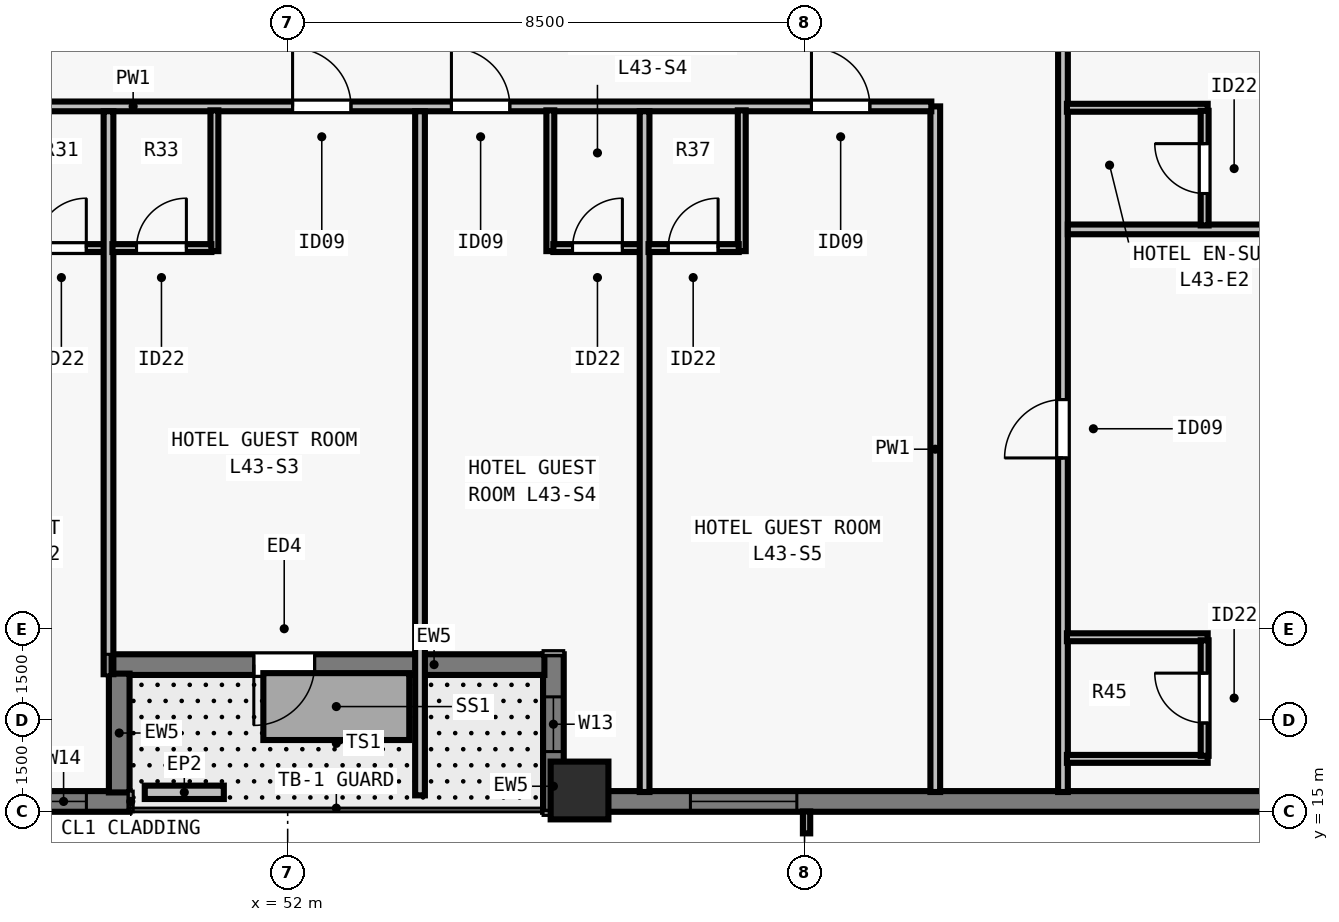
"""IFC4 building model, lengths in metres.
Left out: names, types, materials, properties, quantities, classifications, styles, units other than length and angle.
Written with IfcOpenShell. Run it as: python <this file> out.ifc"""

import sys

from ifc_helpers import new_model, si_unit, direction, frame, frame_2d, origin, origin_2d, place, context, subcontext, project, spatial, rectangle, extrude, element, fill, save


model = new_model("IFC4")
c1 = context("Model", 3, precision=1e-05, world=origin(), true_north=direction((0.0, 1.0)))
c2 = subcontext(c1, "Body", "Model", "MODEL_VIEW")
j1 = project(units=[si_unit("LENGTHUNIT", "METRE"), si_unit("PLANEANGLEUNIT", "RADIAN")], contexts=[c1])
p1 = place(None, origin())
s1 = spatial("IfcSite", under=j1, at=p1, CompositionType="ELEMENT")
p2 = place(p1, origin())
s2 = spatial("IfcBuilding", under=s1, at=p2, CompositionType="ELEMENT")
p3 = place(p2, frame((0.0, 0.0, 158.5)))
s3 = spatial("IfcBuildingStorey", under=s2, at=p3, CompositionType="ELEMENT", Elevation=158.5)
p4 = place(p3, frame((56.8, 15.35, 0.0), z_axis=(0.0, 0.0, 1.0), x_axis=(1.0, 0.0, 0.0)))
e1 = element("IfcColumn", 1, at=p4, inside=s3, PredefinedType="COLUMN", context=c2, shape_type="SweptSolid", body=[
    extrude(rectangle(XDim=0.95, YDim=0.95, at=origin_2d()), origin(), (0.0, 0.0, 1.0), 3.5),
])
p5 = place(p3, frame((49.4, 15.17, 0.0), z_axis=(0.0, 0.0, 1.0), x_axis=(-1.0, 0.0, 0.0)))
e2 = element("IfcWall", 2, at=p5, inside=s3, PredefinedType="SOLIDWALL", context=c2, shape_type="SweptSolid", body=[
    extrude(rectangle(XDim=17.082, YDim=0.34, at=frame_2d((8.541, 0.0))), origin(), (0.0, 0.0, 1.0), 3.28),
])
p6 = place(p5, frame((6.566, 0.0, 0.8)))
e3 = element("IfcOpeningElement", 3, at=p6, cuts=e2, PredefinedType="OPENING", context=c2, shape_type="SweptSolid", body=[
    extrude(rectangle(XDim=1.35, YDim=1.66, at=frame_2d((0.675, 0.83))), frame((0.0, 0.18, 0.0), z_axis=(0.0, -1.0, 0.0), x_axis=(1.0, 0.0, 0.0)), (0.0, 0.0, 1.0), 0.36),
])
p7 = place(p5, frame((0.71, 0.0, 0.8)))
e4 = element("IfcOpeningElement", 4, at=p7, cuts=e2, PredefinedType="OPENING", context=c2, shape_type="SweptSolid", body=[
    extrude(rectangle(XDim=0.75, YDim=1.66, at=frame_2d((0.375, 0.83))), frame((0.0, 0.18, 0.0), z_axis=(0.0, -1.0, 0.0), x_axis=(1.0, 0.0, 0.0)), (0.0, 0.0, 1.0), 0.36),
])
p8 = place(p3, frame((72.0, 15.17, 0.0), z_axis=(0.0, 0.0, 1.0), x_axis=(-1.0, 0.0, 0.0)))
e5 = element("IfcWall", 5, at=p8, inside=s3, PredefinedType="SOLIDWALL", context=c2, shape_type="SweptSolid", body=[
    extrude(rectangle(XDim=15.482, YDim=0.34, at=frame_2d((7.741, 0.0))), origin(), (0.0, 0.0, 1.0), 3.28),
])
p9 = place(p8, frame((11.627, 0.0, 0.8)))
e6 = element("IfcOpeningElement", 6, at=p9, cuts=e5, PredefinedType="OPENING", context=c2, shape_type="SweptSolid", body=[
    extrude(rectangle(XDim=1.75, YDim=1.66, at=frame_2d((0.875, 0.83))), frame((0.0, 0.18, 0.0), z_axis=(0.0, -1.0, 0.0), x_axis=(1.0, 0.0, 0.0)), (0.0, 0.0, 1.0), 0.36),
])
p10 = place(p3, frame((56.37, 15.0, 0.0), z_axis=(0.0, 0.0, 1.0), x_axis=(0.0, 1.0, 0.0)))
e7 = element("IfcWall", 7, at=p10, inside=s3, PredefinedType="SOLIDWALL", context=c2, shape_type="SweptSolid", body=[
    extrude(rectangle(XDim=2.59, YDim=0.34, at=frame_2d((1.295, 0.0))), origin(), (0.0, 0.0, 1.0), 3.28),
])
p11 = place(p10, frame((0.99, 0.0, 0.8)))
e8 = element("IfcOpeningElement", 8, at=p11, cuts=e7, PredefinedType="OPENING", context=c2, shape_type="SweptSolid", body=[
    extrude(rectangle(XDim=0.9, YDim=1.66, at=frame_2d((0.45, 0.83))), frame((0.0, 0.18, 0.0), z_axis=(0.0, -1.0, 0.0), x_axis=(1.0, 0.0, 0.0)), (0.0, 0.0, 1.0), 0.36),
])
p12 = place(p3, frame((56.222, 17.42, 0.0), z_axis=(0.0, 0.0, 1.0), x_axis=(-1.0, 0.0, 0.0)))
e9 = element("IfcWall", 9, at=p12, inside=s3, PredefinedType="SOLIDWALL", context=c2, shape_type="SweptSolid", body=[
    extrude(rectangle(XDim=7.162, YDim=0.34, at=frame_2d((3.581, 0.0))), origin(), (0.0, 0.0, 1.0), 3.28),
])
p13 = place(p12, frame((3.779, 0.0, 0.0)))
e10 = element("IfcOpeningElement", 10, at=p13, cuts=e9, PredefinedType="OPENING", context=c2, shape_type="SweptSolid", body=[
    extrude(rectangle(XDim=1.0, YDim=2.15, at=frame_2d((0.5, 1.075))), frame((0.0, 0.18, 0.0), z_axis=(0.0, -1.0, 0.0), x_axis=(1.0, 0.0, 0.0)), (0.0, 0.0, 1.0), 0.36),
])
p14 = place(p3, frame((49.23, 17.272, 0.0), z_axis=(0.0, 0.0, 1.0), x_axis=(0.0, -1.0, 0.0)))
e11 = element("IfcWall", 11, at=p14, inside=s3, PredefinedType="SOLIDWALL", context=c2, shape_type="SweptSolid", body=[
    extrude(rectangle(XDim=1.954, YDim=0.34, at=frame_2d((0.977, 0.0))), origin(), (0.0, 0.0, 1.0), 3.28),
])
p15 = place(p3, frame((49.65, 15.32, 0.0), z_axis=(0.0, 0.0, 1.0), x_axis=(1.0, 0.0, 0.0)))
e12 = element("IfcWall", 12, at=p15, inside=s3, PredefinedType="PARAPET", context=c2, shape_type="SweptSolid", body=[
    extrude(rectangle(XDim=1.3, YDim=0.22, at=frame_2d((0.65, 0.0))), origin(), (0.0, 0.0, 1.0), 0.55),
])
p16 = place(p3, frame((64.75, 15.325, 0.0), z_axis=(0.0, 0.0, 1.0), x_axis=(0.0, 1.0, 0.0)))
e13 = element("IfcWall", 13, at=p16, inside=s3, PredefinedType="PARTITIONING", context=c2, shape_type="SweptSolid", body=[
    extrude(rectangle(XDim=47.35, YDim=0.16, at=frame_2d((23.675, 0.0))), origin(), (0.0, 0.0, 1.0), 2.555),
])
p17 = place(p16, frame((5.494, 0.0, 0.0)))
e14 = element("IfcOpeningElement", 14, at=p17, cuts=e13, PredefinedType="OPENING", context=c2, shape_type="SweptSolid", body=[
    extrude(rectangle(XDim=0.96, YDim=2.15, at=frame_2d((0.48, 1.075))), frame((0.0, 0.09, 0.0), z_axis=(0.0, -1.0, 0.0), x_axis=(1.0, 0.0, 0.0)), (0.0, 0.0, 1.0), 0.18),
])
p18 = place(p16, frame((14.796, 0.0, 0.0)))
e15 = element("IfcOpeningElement", 15, at=p18, cuts=e13, PredefinedType="OPENING", context=c2, shape_type="SweptSolid", body=[
    extrude(rectangle(XDim=0.96, YDim=2.15, at=frame_2d((0.48, 1.075))), frame((0.0, 0.09, 0.0), z_axis=(0.0, -1.0, 0.0), x_axis=(1.0, 0.0, 0.0)), (0.0, 0.0, 1.0), 0.18),
])
p19 = place(p16, frame((24.228, 0.0, 0.0)))
e16 = element("IfcOpeningElement", 16, at=p19, cuts=e13, PredefinedType="OPENING", context=c2, shape_type="SweptSolid", body=[
    extrude(rectangle(XDim=0.96, YDim=2.15, at=frame_2d((0.48, 1.075))), frame((0.0, 0.09, 0.0), z_axis=(0.0, -1.0, 0.0), x_axis=(1.0, 0.0, 0.0)), (0.0, 0.0, 1.0), 0.18),
])
p20 = place(p16, frame((33.66, 0.0, 0.0)))
e17 = element("IfcOpeningElement", 17, at=p20, cuts=e13, PredefinedType="OPENING", context=c2, shape_type="SweptSolid", body=[
    extrude(rectangle(XDim=0.96, YDim=2.15, at=frame_2d((0.48, 1.075))), frame((0.0, 0.09, 0.0), z_axis=(0.0, -1.0, 0.0), x_axis=(1.0, 0.0, 0.0)), (0.0, 0.0, 1.0), 0.18),
])
p21 = place(p16, frame((43.229, 0.0, 0.0)))
e18 = element("IfcOpeningElement", 18, at=p21, cuts=e13, PredefinedType="OPENING", context=c2, shape_type="SweptSolid", body=[
    extrude(rectangle(XDim=0.96, YDim=2.15, at=frame_2d((0.48, 1.075))), frame((0.0, 0.09, 0.0), z_axis=(0.0, -1.0, 0.0), x_axis=(1.0, 0.0, 0.0)), (0.0, 0.0, 1.0), 0.18),
])
p22 = place(p3, frame((62.65, 15.325, 0.0), z_axis=(0.0, 0.0, 1.0), x_axis=(0.0, 1.0, 0.0)))
e19 = element("IfcWall", 19, at=p22, inside=s3, PredefinedType="PARTITIONING", context=c2, shape_type="SweptSolid", body=[
    extrude(rectangle(XDim=11.275, YDim=0.16, at=frame_2d((5.638, 0.0))), origin(), (0.0, 0.0, 1.0), 3.28),
])
p23 = place(p3, frame((40.515, 26.6, 0.0), z_axis=(0.0, 0.0, 1.0), x_axis=(1.0, 0.0, 0.0)))
e20 = element("IfcWall", 20, at=p23, inside=s3, PredefinedType="PARTITIONING", context=c2, shape_type="SweptSolid", body=[
    extrude(rectangle(XDim=22.07, YDim=0.16, at=frame_2d((11.035, 0.0))), origin(), (0.0, 0.0, 1.0), 3.28),
])
p24 = place(p23, frame((3.072, 0.0, 0.0)))
e21 = element("IfcOpeningElement", 21, at=p24, cuts=e20, PredefinedType="OPENING", context=c2, shape_type="SweptSolid", body=[
    extrude(rectangle(XDim=0.96, YDim=2.15, at=frame_2d((0.48, 1.075))), frame((0.0, 0.09, 0.0), z_axis=(0.0, -1.0, 0.0), x_axis=(1.0, 0.0, 0.0)), (0.0, 0.0, 1.0), 0.18),
])
p25 = place(p23, frame((5.362, 0.0, 0.0)))
e22 = element("IfcOpeningElement", 22, at=p25, cuts=e20, PredefinedType="OPENING", context=c2, shape_type="SweptSolid", body=[
    extrude(rectangle(XDim=0.96, YDim=2.15, at=frame_2d((0.48, 1.075))), frame((0.0, 0.09, 0.0), z_axis=(0.0, -1.0, 0.0), x_axis=(1.0, 0.0, 0.0)), (0.0, 0.0, 1.0), 0.18),
])
p26 = place(p23, frame((11.566, 0.0, 0.0)))
e23 = element("IfcOpeningElement", 23, at=p26, cuts=e20, PredefinedType="OPENING", context=c2, shape_type="SweptSolid", body=[
    extrude(rectangle(XDim=0.96, YDim=2.15, at=frame_2d((0.48, 1.075))), frame((0.0, 0.09, 0.0), z_axis=(0.0, -1.0, 0.0), x_axis=(1.0, 0.0, 0.0)), (0.0, 0.0, 1.0), 0.18),
])
p27 = place(p23, frame((14.178, 0.0, 0.0)))
e24 = element("IfcOpeningElement", 24, at=p27, cuts=e20, PredefinedType="OPENING", context=c2, shape_type="SweptSolid", body=[
    extrude(rectangle(XDim=0.96, YDim=2.15, at=frame_2d((0.48, 1.075))), frame((0.0, 0.09, 0.0), z_axis=(0.0, -1.0, 0.0), x_axis=(1.0, 0.0, 0.0)), (0.0, 0.0, 1.0), 0.18),
])
p28 = place(p23, frame((20.099, 0.0, 0.0)))
e25 = element("IfcOpeningElement", 25, at=p28, cuts=e20, PredefinedType="OPENING", context=c2, shape_type="SweptSolid", body=[
    extrude(rectangle(XDim=0.96, YDim=2.15, at=frame_2d((0.48, 1.075))), frame((0.0, 0.09, 0.0), z_axis=(0.0, -1.0, 0.0), x_axis=(1.0, 0.0, 0.0)), (0.0, 0.0, 1.0), 0.18),
])
p29 = place(p3, frame((47.553, 24.27, 0.0), z_axis=(0.0, 0.0, 1.0), x_axis=(1.0, 0.0, 0.0)))
e26 = element("IfcWall", 26, at=p29, inside=s3, PredefinedType="PLUMBINGWALL", context=c2, shape_type="SweptSolid", body=[
    extrude(rectangle(XDim=1.55, YDim=0.13, at=frame_2d((0.775, 0.0))), origin(), (0.0, 0.0, 1.0), 3.28),
])
p30 = place(p29, frame((0.315, 0.0, 0.0)))
e27 = element("IfcOpeningElement", 27, at=p30, cuts=e26, PredefinedType="OPENING", context=c2, shape_type="SweptSolid", body=[
    extrude(rectangle(XDim=0.82, YDim=2.1, at=frame_2d((0.41, 1.05))), frame((0.0, 0.075, 0.0), z_axis=(0.0, -1.0, 0.0), x_axis=(1.0, 0.0, 0.0)), (0.0, 0.0, 1.0), 0.15),
])
p31 = place(p3, frame((49.053, 17.262, 0.0), z_axis=(0.0, 0.0, 1.0), x_axis=(0.0, 1.0, 0.0)))
e28 = element("IfcWall", 28, at=p31, inside=s3, PredefinedType="PARTITIONING", context=c2, shape_type="SweptSolid", body=[
    extrude(rectangle(XDim=9.258, YDim=0.16, at=frame_2d((4.629, 0.0))), origin(), (0.0, 0.0, 1.0), 2.896),
])
p32 = place(p3, frame((50.795, 24.22, 0.0), z_axis=(0.0, 0.0, 1.0), x_axis=(0.0, 1.0, 0.0)))
e29 = element("IfcWall", 29, at=p32, inside=s3, PredefinedType="PLUMBINGWALL", context=c2, shape_type="SweptSolid", body=[
    extrude(rectangle(XDim=2.315, YDim=0.13, at=frame_2d((1.157, 0.0))), origin(), (0.0, 0.0, 1.0), 3.28),
])
p33 = place(p3, frame((49.118, 24.27, 0.0), z_axis=(0.0, 0.0, 1.0), x_axis=(1.0, 0.0, 0.0)))
e30 = element("IfcWall", 30, at=p33, inside=s3, PredefinedType="PLUMBINGWALL", context=c2, shape_type="SweptSolid", body=[
    extrude(rectangle(XDim=1.627, YDim=0.13, at=frame_2d((0.813, 0.0))), origin(), (0.0, 0.0, 1.0), 3.28),
])
p34 = place(p33, frame((0.396, 0.0, 0.0)))
e31 = element("IfcOpeningElement", 31, at=p34, cuts=e30, PredefinedType="OPENING", context=c2, shape_type="SweptSolid", body=[
    extrude(rectangle(XDim=0.82, YDim=2.1, at=frame_2d((0.41, 1.05))), frame((0.0, 0.075, 0.0), z_axis=(0.0, -1.0, 0.0), x_axis=(1.0, 0.0, 0.0)), (0.0, 0.0, 1.0), 0.15),
])
p35 = place(p3, frame((54.177, 15.27, 0.0), z_axis=(0.0, 0.0, 1.0), x_axis=(0.0, 1.0, 0.0)))
e32 = element("IfcWall", 32, at=p35, inside=s3, PredefinedType="PARTITIONING", context=c2, shape_type="SweptSolid", body=[
    extrude(rectangle(XDim=11.25, YDim=0.16, at=frame_2d((5.625, 0.0))), origin(), (0.0, 0.0, 1.0), 2.896),
])
p36 = place(p3, frame((56.32, 24.22, 0.0), z_axis=(0.0, 0.0, 1.0), x_axis=(0.0, 1.0, 0.0)))
e33 = element("IfcWall", 33, at=p36, inside=s3, PredefinedType="PLUMBINGWALL", context=c2, shape_type="SweptSolid", body=[
    extrude(rectangle(XDim=2.315, YDim=0.13, at=frame_2d((1.157, 0.0))), origin(), (0.0, 0.0, 1.0), 3.28),
])
p37 = place(p3, frame((56.369, 24.27, 0.0), z_axis=(0.0, 0.0, 1.0), x_axis=(1.0, 0.0, 0.0)))
e34 = element("IfcWall", 34, at=p37, inside=s3, PredefinedType="PLUMBINGWALL", context=c2, shape_type="SweptSolid", body=[
    extrude(rectangle(XDim=1.55, YDim=0.13, at=frame_2d((0.775, 0.0))), origin(), (0.0, 0.0, 1.0), 3.28),
])
p38 = place(p37, frame((0.315, 0.0, 0.0)))
e35 = element("IfcOpeningElement", 35, at=p38, cuts=e34, PredefinedType="OPENING", context=c2, shape_type="SweptSolid", body=[
    extrude(rectangle(XDim=0.82, YDim=2.1, at=frame_2d((0.41, 1.05))), frame((0.0, 0.075, 0.0), z_axis=(0.0, -1.0, 0.0), x_axis=(1.0, 0.0, 0.0)), (0.0, 0.0, 1.0), 0.15),
])
p39 = place(p3, frame((57.869, 15.325, 0.0), z_axis=(0.0, 0.0, 1.0), x_axis=(0.0, 1.0, 0.0)))
e36 = element("IfcWall", 36, at=p39, inside=s3, PredefinedType="PARTITIONING", context=c2, shape_type="SweptSolid", body=[
    extrude(rectangle(XDim=11.195, YDim=0.16, at=frame_2d((5.598, 0.0))), origin(), (0.0, 0.0, 1.0), 3.28),
])
p40 = place(p3, frame((59.468, 24.22, 0.0), z_axis=(0.0, 0.0, 1.0), x_axis=(0.0, 1.0, 0.0)))
e37 = element("IfcWall", 37, at=p40, inside=s3, PredefinedType="PLUMBINGWALL", context=c2, shape_type="SweptSolid", body=[
    extrude(rectangle(XDim=2.315, YDim=0.13, at=frame_2d((1.157, 0.0))), origin(), (0.0, 0.0, 1.0), 3.28),
])
p41 = place(p3, frame((57.935, 24.27, 0.0), z_axis=(0.0, 0.0, 1.0), x_axis=(1.0, 0.0, 0.0)))
e38 = element("IfcWall", 38, at=p41, inside=s3, PredefinedType="PLUMBINGWALL", context=c2, shape_type="SweptSolid", body=[
    extrude(rectangle(XDim=1.483, YDim=0.13, at=frame_2d((0.742, 0.0))), origin(), (0.0, 0.0, 1.0), 3.28),
])
p42 = place(p41, frame((0.324, 0.0, 0.0)))
e39 = element("IfcOpeningElement", 39, at=p42, cuts=e38, PredefinedType="OPENING", context=c2, shape_type="SweptSolid", body=[
    extrude(rectangle(XDim=0.82, YDim=2.1, at=frame_2d((0.41, 1.05))), frame((0.0, 0.075, 0.0), z_axis=(0.0, -1.0, 0.0), x_axis=(1.0, 0.0, 0.0)), (0.0, 0.0, 1.0), 0.15),
])
for number, where, z_axis, x_axis in (
    (40, (64.815, 15.87, 0.0), (0.0, 0.0, 1.0), (1.0, 0.0, 0.0)),
    (41, (64.815, 17.87, 0.0), (0.0, 0.0, 1.0), (1.0, 0.0, 0.0)),
):
    element("IfcWall", number, at=place(p3, frame(where, z_axis=z_axis, x_axis=x_axis)), inside=s3, PredefinedType="PLUMBINGWALL", context=c2, shape_type="SweptSolid", body=[
        extrude(rectangle(XDim=2.315, YDim=0.13, at=frame_2d((1.157, 0.0))), origin(), (0.0, 0.0, 1.0), 3.28),
    ])
p43 = place(p3, frame((67.08, 15.92, 0.0), z_axis=(0.0, 0.0, 1.0), x_axis=(0.0, 1.0, 0.0)))
e42 = element("IfcWall", 42, at=p43, inside=s3, PredefinedType="PLUMBINGWALL", context=c2, shape_type="SweptSolid", body=[
    extrude(rectangle(XDim=1.9, YDim=0.13, at=frame_2d((0.95, 0.0))), origin(), (0.0, 0.0, 1.0), 3.28),
])
p44 = place(p43, frame((0.54, 0.0, 0.0)))
e43 = element("IfcOpeningElement", 43, at=p44, cuts=e42, PredefinedType="OPENING", context=c2, shape_type="SweptSolid", body=[
    extrude(rectangle(XDim=0.82, YDim=2.1, at=frame_2d((0.41, 1.05))), frame((0.0, 0.075, 0.0), z_axis=(0.0, -1.0, 0.0), x_axis=(1.0, 0.0, 0.0)), (0.0, 0.0, 1.0), 0.15),
])
p45 = place(p3, frame((64.83, 24.577, 0.0), z_axis=(0.0, 0.0, 1.0), x_axis=(1.0, 0.0, 0.0)))
e44 = element("IfcWall", 44, at=p45, inside=s3, PredefinedType="PARTITIONING", context=c2, shape_type="SweptSolid", body=[
    extrude(rectangle(XDim=10.845, YDim=0.16, at=frame_2d((5.422, 0.0))), origin(), (0.0, 0.0, 1.0), 2.896),
])
p46 = place(p3, frame((64.815, 26.577, 0.0), z_axis=(0.0, 0.0, 1.0), x_axis=(1.0, 0.0, 0.0)))
e45 = element("IfcWall", 45, at=p46, inside=s3, PredefinedType="PLUMBINGWALL", context=c2, shape_type="SweptSolid", body=[
    extrude(rectangle(XDim=2.315, YDim=0.13, at=frame_2d((1.157, 0.0))), origin(), (0.0, 0.0, 1.0), 2.896),
])
p47 = place(p3, frame((67.08, 24.642, 0.0), z_axis=(0.0, 0.0, 1.0), x_axis=(0.0, 1.0, 0.0)))
e46 = element("IfcWall", 46, at=p47, inside=s3, PredefinedType="PLUMBINGWALL", context=c2, shape_type="SweptSolid", body=[
    extrude(rectangle(XDim=1.885, YDim=0.13, at=frame_2d((0.942, 0.0))), origin(), (0.0, 0.0, 1.0), 3.28),
])
p48 = place(p47, frame((0.525, 0.0, 0.0)))
e47 = element("IfcOpeningElement", 47, at=p48, cuts=e46, PredefinedType="OPENING", context=c2, shape_type="SweptSolid", body=[
    extrude(rectangle(XDim=0.82, YDim=2.1, at=frame_2d((0.41, 1.05))), frame((0.0, 0.075, 0.0), z_axis=(0.0, -1.0, 0.0), x_axis=(1.0, 0.0, 0.0)), (0.0, 0.0, 1.0), 0.15),
])
p49 = place(p9, origin())
e48 = element("IfcWindow", 48, at=p49, inside=s3, PartitioningType="SINGLE_PANEL", PredefinedType="WINDOW", context=c2, shape_type="SweptSolid", body=[
    extrude(rectangle(XDim=1.75, YDim=1.66, at=frame_2d((0.875, 0.83))), frame((0.0, -0.05, 0.0), z_axis=(0.0, -1.0, 0.0), x_axis=(1.0, 0.0, 0.0)), (0.0, 0.0, 1.0), 0.06),
])
fill(e6, e48)
p50 = place(p13, origin())
e49 = element("IfcDoor", 49, at=p50, inside=s3, OperationType="SINGLE_SWING_RIGHT", PredefinedType="DOOR", context=c2, shape_type="SweptSolid", body=[
    extrude(rectangle(XDim=1.0, YDim=2.15, at=frame_2d((0.5, 1.075))), frame((0.0, 0.025, 0.0), z_axis=(0.0, -1.0, 0.0), x_axis=(1.0, 0.0, 0.0)), (0.0, 0.0, 1.0), 0.05),
])
fill(e10, e49)
p51 = place(p7, origin())
e50 = element("IfcWindow", 50, at=p51, inside=s3, PartitioningType="SINGLE_PANEL", PredefinedType="WINDOW", context=c2, shape_type="SweptSolid", body=[
    extrude(rectangle(XDim=0.75, YDim=1.66, at=frame_2d((0.375, 0.83))), frame((0.0, -0.04, 0.0), z_axis=(0.0, -1.0, 0.0), x_axis=(1.0, 0.0, 0.0)), (0.0, 0.0, 1.0), 0.06),
])
fill(e4, e50)
p52 = place(p11, origin())
e51 = element("IfcWindow", 51, at=p52, inside=s3, PartitioningType="SINGLE_PANEL", PredefinedType="WINDOW", context=c2, shape_type="SweptSolid", body=[
    extrude(rectangle(XDim=0.9, YDim=1.66, at=frame_2d((0.45, 0.83))), frame((0.0, -0.04, 0.0), z_axis=(0.0, -1.0, 0.0), x_axis=(1.0, 0.0, 0.0)), (0.0, 0.0, 1.0), 0.06),
])
fill(e8, e51)
p53 = place(p30, origin())
e52 = element("IfcDoor", 52, at=p53, inside=s3, OperationType="SINGLE_SWING_RIGHT", PredefinedType="DOOR", context=c2, shape_type="SweptSolid", body=[
    extrude(rectangle(XDim=0.82, YDim=2.1, at=frame_2d((0.41, 1.05))), frame((0.0, 0.025, 0.0), z_axis=(0.0, -1.0, 0.0), x_axis=(1.0, 0.0, 0.0)), (0.0, 0.0, 1.0), 0.05),
])
fill(e27, e52)
p54 = place(p34, origin())
e53 = element("IfcDoor", 53, at=p54, inside=s3, OperationType="SINGLE_SWING_RIGHT", PredefinedType="DOOR", context=c2, shape_type="SweptSolid", body=[
    extrude(rectangle(XDim=0.82, YDim=2.1, at=frame_2d((0.41, 1.05))), frame((0.0, 0.025, 0.0), z_axis=(0.0, -1.0, 0.0), x_axis=(1.0, 0.0, 0.0)), (0.0, 0.0, 1.0), 0.05),
])
fill(e31, e53)
p55 = place(p26, origin())
e54 = element("IfcDoor", 54, at=p55, inside=s3, OperationType="SINGLE_SWING_LEFT", PredefinedType="DOOR", context=c2, shape_type="SweptSolid", body=[
    extrude(rectangle(XDim=0.96, YDim=2.15, at=frame_2d((0.48, 1.075))), frame((0.0, 0.025, 0.0), z_axis=(0.0, -1.0, 0.0), x_axis=(1.0, 0.0, 0.0)), (0.0, 0.0, 1.0), 0.05),
])
fill(e23, e54)
p56 = place(p38, origin())
e55 = element("IfcDoor", 55, at=p56, inside=s3, OperationType="SINGLE_SWING_RIGHT", PredefinedType="DOOR", context=c2, shape_type="SweptSolid", body=[
    extrude(rectangle(XDim=0.82, YDim=2.1, at=frame_2d((0.41, 1.05))), frame((0.0, 0.025, 0.0), z_axis=(0.0, -1.0, 0.0), x_axis=(1.0, 0.0, 0.0)), (0.0, 0.0, 1.0), 0.05),
])
fill(e35, e55)
p57 = place(p27, origin())
e56 = element("IfcDoor", 56, at=p57, inside=s3, OperationType="SINGLE_SWING_LEFT", PredefinedType="DOOR", context=c2, shape_type="SweptSolid", body=[
    extrude(rectangle(XDim=0.96, YDim=2.15, at=frame_2d((0.48, 1.075))), frame((0.0, 0.025, 0.0), z_axis=(0.0, -1.0, 0.0), x_axis=(1.0, 0.0, 0.0)), (0.0, 0.0, 1.0), 0.05),
])
fill(e24, e56)
p58 = place(p42, origin())
e57 = element("IfcDoor", 57, at=p58, inside=s3, OperationType="SINGLE_SWING_RIGHT", PredefinedType="DOOR", context=c2, shape_type="SweptSolid", body=[
    extrude(rectangle(XDim=0.82, YDim=2.1, at=frame_2d((0.41, 1.05))), frame((0.0, 0.025, 0.0), z_axis=(0.0, -1.0, 0.0), x_axis=(1.0, 0.0, 0.0)), (0.0, 0.0, 1.0), 0.05),
])
fill(e39, e57)
p59 = place(p28, origin())
e58 = element("IfcDoor", 58, at=p59, inside=s3, OperationType="SINGLE_SWING_LEFT", PredefinedType="DOOR", context=c2, shape_type="SweptSolid", body=[
    extrude(rectangle(XDim=0.96, YDim=2.15, at=frame_2d((0.48, 1.075))), frame((0.0, 0.025, 0.0), z_axis=(0.0, -1.0, 0.0), x_axis=(1.0, 0.0, 0.0)), (0.0, 0.0, 1.0), 0.05),
])
fill(e25, e58)
p60 = place(p44, origin())
e59 = element("IfcDoor", 59, at=p60, inside=s3, OperationType="SINGLE_SWING_RIGHT", PredefinedType="DOOR", context=c2, shape_type="SweptSolid", body=[
    extrude(rectangle(XDim=0.82, YDim=2.1, at=frame_2d((0.41, 1.05))), frame((0.0, 0.025, 0.0), z_axis=(0.0, -1.0, 0.0), x_axis=(1.0, 0.0, 0.0)), (0.0, 0.0, 1.0), 0.05),
])
fill(e43, e59)
p61 = place(p17, origin())
e60 = element("IfcDoor", 60, at=p61, inside=s3, OperationType="SINGLE_SWING_LEFT", PredefinedType="DOOR", context=c2, shape_type="SweptSolid", body=[
    extrude(rectangle(XDim=0.96, YDim=2.15, at=frame_2d((0.48, 1.075))), frame((0.0, 0.025, 0.0), z_axis=(0.0, -1.0, 0.0), x_axis=(1.0, 0.0, 0.0)), (0.0, 0.0, 1.0), 0.05),
])
fill(e14, e60)
p62 = place(p48, origin())
e61 = element("IfcDoor", 61, at=p62, inside=s3, OperationType="SINGLE_SWING_RIGHT", PredefinedType="DOOR", context=c2, shape_type="SweptSolid", body=[
    extrude(rectangle(XDim=0.82, YDim=2.1, at=frame_2d((0.41, 1.05))), frame((0.0, 0.025, 0.0), z_axis=(0.0, -1.0, 0.0), x_axis=(1.0, 0.0, 0.0)), (0.0, 0.0, 1.0), 0.05),
])
fill(e47, e61)
save(model, sys.argv[1])
